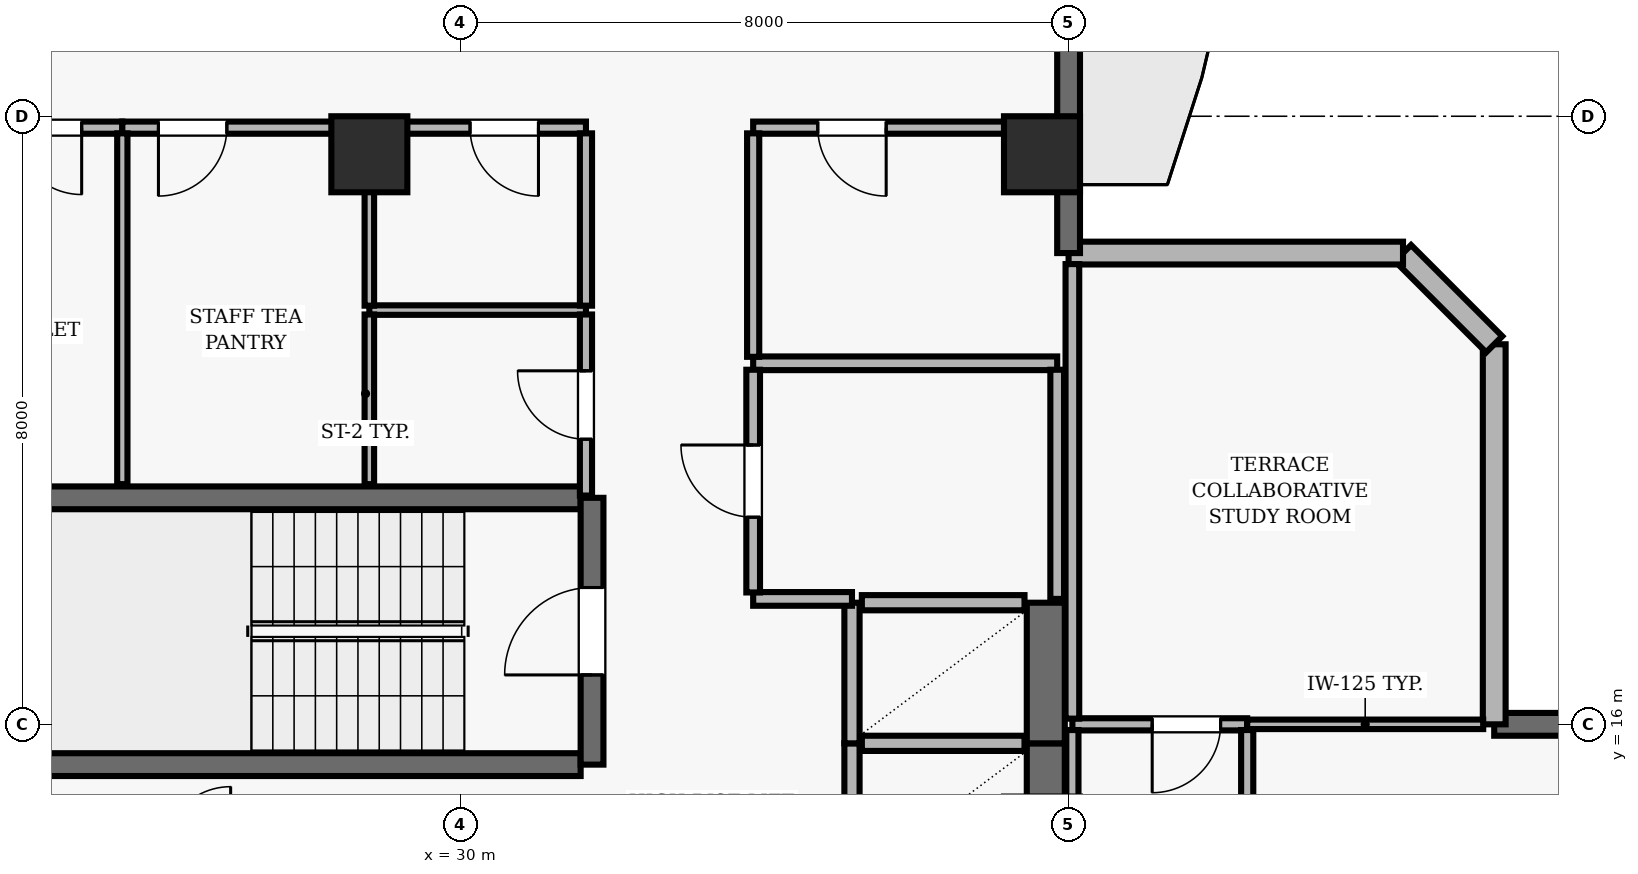
"""IFC4 building model, lengths in metres.
Left out: names, types, materials, properties, quantities, classifications, styles, units other than length and angle.
Written with IfcOpenShell. Run it as: python <this file> out.ifc"""

import sys

from ifc_helpers import new_model, si_unit, direction, frame, frame_2d, origin, origin_2d, place, context, subcontext, project, spatial, rectangle, extrude, element, fill, save


model = new_model("IFC4")
c1 = context("Model", 3, precision=1e-05, world=origin(), true_north=direction((0.0, 1.0)))
c2 = subcontext(c1, "Body", "Model", "MODEL_VIEW")
j1 = project(units=[si_unit("LENGTHUNIT", "METRE"), si_unit("PLANEANGLEUNIT", "RADIAN")], contexts=[c1])
p1 = place(None, origin())
s1 = spatial("IfcSite", under=j1, at=p1, CompositionType="ELEMENT")
p2 = place(p1, origin())
s2 = spatial("IfcBuilding", under=s1, at=p2, CompositionType="ELEMENT")
p3 = place(p2, frame((0.0, 0.0, 226.5)))
s3 = spatial("IfcBuildingStorey", under=s2, at=p3, CompositionType="ELEMENT", Elevation=226.5)
for number, where, z_axis, x_axis in (
    (1, (28.8, 23.5, 0.0), (0.0, 0.0, 1.0), (1.0, 0.0, 0.0)),
    (2, (37.65, 23.5, 0.0), (0.0, 0.0, 1.0), (1.0, 0.0, 0.0)),
):
    element("IfcColumn", number, at=place(p3, frame(where, z_axis=z_axis, x_axis=x_axis)), inside=s3, PredefinedType="COLUMN", context=c2, shape_type="SweptSolid", body=[
        extrude(rectangle(XDim=1.0, YDim=1.0, at=origin_2d()), origin(), (0.0, 0.0, 1.0), 3.9),
    ])
p4 = place(p3, frame((62.7, 16.0, 0.0), z_axis=(0.0, 0.0, 1.0), x_axis=(-1.0, 0.0, 0.0)))
e3 = element("IfcWall", 3, at=p4, inside=s3, PredefinedType="SOLIDWALL", context=c2, shape_type="SweptSolid", body=[
    extrude(rectangle(XDim=19.1, YDim=0.3, at=frame_2d((9.55, 0.0))), origin(), (0.0, 0.0, 1.0), 3.69),
])
p5 = place(p4, frame((7.85, 0.0, 0.0)))
e4 = element("IfcOpeningElement", 4, at=p5, cuts=e3, PredefinedType="OPENING", context=c2, shape_type="SweptSolid", body=[
    extrude(rectangle(XDim=1.0, YDim=2.2, at=frame_2d((0.5, 1.1))), frame((0.0, 0.16, 0.0), z_axis=(0.0, -1.0, 0.0), x_axis=(1.0, 0.0, 0.0)), (0.0, 0.0, 1.0), 0.32),
])
p6 = place(p4, frame((1.683, 0.0, 0.9)))
e5 = element("IfcOpeningElement", 5, at=p6, cuts=e3, PredefinedType="OPENING", context=c2, shape_type="SweptSolid", body=[
    extrude(rectangle(XDim=3.0, YDim=2.2, at=frame_2d((1.5, 1.1))), frame((0.0, 0.16, 0.0), z_axis=(0.0, -1.0, 0.0), x_axis=(1.0, 0.0, 0.0)), (0.0, 0.0, 1.0), 0.32),
])
p7 = place(p3, frame((43.6, 16.0, 0.0), z_axis=(0.0, 0.0, 1.0), x_axis=(0.0, 1.0, 0.0)))
e6 = element("IfcWall", 6, at=p7, inside=s3, PredefinedType="SOLIDWALL", context=c2, shape_type="SweptSolid", body=[
    extrude(rectangle(XDim=5.0, YDim=0.3, at=frame_2d((2.5, 0.0))), origin(), (0.0, 0.0, 1.0), 3.69),
])
p8 = place(p3, frame((43.6, 21.0, 0.0), z_axis=(0.0, 0.0, 1.0), x_axis=(-0.707178703759, 0.707034851297, 0.0)))
e7 = element("IfcWall", 7, at=p8, inside=s3, PredefinedType="SOLIDWALL", context=c2, shape_type="SweptSolid", body=[
    extrude(rectangle(XDim=1.697, YDim=0.3, at=frame_2d((0.849, 0.0))), origin(), (0.0, 0.0, 1.0), 3.69),
])
p9 = place(p3, frame((42.4, 22.2, 0.0), z_axis=(0.0, 0.0, 1.0), x_axis=(-1.0, 0.0, 0.0)))
e8 = element("IfcWall", 8, at=p9, inside=s3, PredefinedType="SOLIDWALL", context=c2, shape_type="SweptSolid", body=[
    extrude(rectangle(XDim=4.4, YDim=0.3, at=frame_2d((2.2, 0.0))), origin(), (0.0, 0.0, 1.0), 3.69),
])
p10 = place(p3, frame((38.0, 22.2, 0.0), z_axis=(0.0, 0.0, 1.0), x_axis=(0.0, 1.0, 0.0)))
e9 = element("IfcWall", 9, at=p10, inside=s3, PredefinedType="SOLIDWALL", context=c2, shape_type="SweptSolid", body=[
    extrude(rectangle(XDim=18.5, YDim=0.3, at=frame_2d((9.25, 0.0))), origin(), (0.0, 0.0, 1.0), 3.69),
])
p11 = place(p10, frame((9.95, 0.0, 0.0)))
e10 = element("IfcOpeningElement", 10, at=p11, cuts=e9, PredefinedType="OPENING", context=c2, shape_type="SweptSolid", body=[
    extrude(rectangle(XDim=1.0, YDim=2.2, at=frame_2d((0.5, 1.1))), frame((0.0, 0.16, 0.0), z_axis=(0.0, -1.0, 0.0), x_axis=(1.0, 0.0, 0.0)), (0.0, 0.0, 1.0), 0.32),
])
for number, where, z_axis, x_axis in (
    (11, (31.58, 18.98, 0.0), (0.0, 0.0, 1.0), (-1.0, 0.0, 0.0)),
    (12, (23.22, 15.47, 0.0), (0.0, 0.0, 1.0), (1.0, 0.0, 0.0)),
):
    element("IfcWall", number, at=place(p3, frame(where, z_axis=z_axis, x_axis=x_axis)), inside=s3, PredefinedType="SHEAR", context=c2, shape_type="SweptSolid", body=[
        extrude(rectangle(XDim=8.36, YDim=0.3, at=frame_2d((4.18, 0.0))), origin(), (0.0, 0.0, 1.0), 3.69),
    ])
p12 = place(p3, frame((31.73, 15.47, 0.0), z_axis=(0.0, 0.0, 1.0), x_axis=(0.0, 1.0, 0.0)))
e13 = element("IfcWall", 13, at=p12, inside=s3, PredefinedType="SHEAR", context=c2, shape_type="SweptSolid", body=[
    extrude(rectangle(XDim=3.51, YDim=0.3, at=frame_2d((1.755, 0.0))), origin(), (0.0, 0.0, 1.0), 3.69),
])
p13 = place(p12, frame((1.18, 0.0, 0.0)))
e14 = element("IfcOpeningElement", 14, at=p13, cuts=e13, PredefinedType="OPENING", context=c2, shape_type="SweptSolid", body=[
    extrude(rectangle(XDim=1.15, YDim=2.15, at=frame_2d((0.575, 1.075))), frame((0.0, 0.16, 0.0), z_axis=(0.0, -1.0, 0.0), x_axis=(1.0, 0.0, 0.0)), (0.0, 0.0, 1.0), 0.32),
])
p14 = place(p3, frame((35.15, 15.75, 0.0), z_axis=(0.0, 0.0, 1.0), x_axis=(0.0, -1.0, 0.0)))
e15 = element("IfcWall", 15, at=p14, inside=s3, PredefinedType="SOLIDWALL", context=c2, shape_type="SweptSolid", body=[
    extrude(rectangle(XDim=1.85, YDim=0.2, at=frame_2d((0.925, 0.0))), origin(), (0.0, 0.0, 1.0), 3.69),
])
p15 = place(p3, frame((37.7, 13.9, 0.0), z_axis=(0.0, 0.0, 1.0), x_axis=(0.0, 1.0, 0.0)))
e16 = element("IfcWall", 16, at=p15, inside=s3, PredefinedType="SHEAR", context=c2, shape_type="SweptSolid", body=[
    extrude(rectangle(XDim=1.85, YDim=0.5, at=frame_2d((0.925, 0.0))), origin(), (0.0, 0.0, 1.0), 3.69),
])
p16 = place(p3, frame((37.42, 15.75, 0.0), z_axis=(0.0, 0.0, 1.0), x_axis=(-1.0, 0.0, 0.0)))
e17 = element("IfcWall", 17, at=p16, inside=s3, PredefinedType="SOLIDWALL", context=c2, shape_type="SweptSolid", body=[
    extrude(rectangle(XDim=2.14, YDim=0.2, at=frame_2d((1.07, 0.0))), origin(), (0.0, 0.0, 1.0), 3.69),
])
p17 = place(p3, frame((35.15, 17.6, 0.0), z_axis=(0.0, 0.0, 1.0), x_axis=(0.0, -1.0, 0.0)))
e18 = element("IfcWall", 18, at=p17, inside=s3, PredefinedType="SOLIDWALL", context=c2, shape_type="SweptSolid", body=[
    extrude(rectangle(XDim=1.85, YDim=0.2, at=frame_2d((0.925, 0.0))), origin(), (0.0, 0.0, 1.0), 3.69),
])
p18 = place(p3, frame((37.7, 15.75, 0.0), z_axis=(0.0, 0.0, 1.0), x_axis=(0.0, 1.0, 0.0)))
e19 = element("IfcWall", 19, at=p18, inside=s3, PredefinedType="SHEAR", context=c2, shape_type="SweptSolid", body=[
    extrude(rectangle(XDim=1.85, YDim=0.5, at=frame_2d((0.925, 0.0))), origin(), (0.0, 0.0, 1.0), 3.69),
])
p19 = place(p3, frame((37.42, 17.6, 0.0), z_axis=(0.0, 0.0, 1.0), x_axis=(-1.0, 0.0, 0.0)))
e20 = element("IfcWall", 20, at=p19, inside=s3, PredefinedType="SOLIDWALL", context=c2, shape_type="SweptSolid", body=[
    extrude(rectangle(XDim=2.14, YDim=0.2, at=frame_2d((1.07, 0.0))), origin(), (0.0, 0.0, 1.0), 3.69),
])
p20 = place(p3, frame((25.55, 23.85, 0.0), z_axis=(0.0, 0.0, 1.0), x_axis=(-1.0, 0.0, 0.0)))
e21 = element("IfcWall", 21, at=p20, inside=s3, PredefinedType="PARTITIONING", context=c2, shape_type="SweptSolid", body=[
    extrude(rectangle(XDim=3.35, YDim=0.16, at=frame_2d((1.675, 0.0))), origin(), (0.0, 0.0, 1.0), 3.146),
])
p21 = place(p20, frame((0.535, 0.0, 0.0)))
e22 = element("IfcOpeningElement", 22, at=p21, cuts=e21, PredefinedType="OPENING", context=c2, shape_type="SweptSolid", body=[
    extrude(rectangle(XDim=0.88, YDim=2.1, at=frame_2d((0.44, 1.05))), frame((0.0, 0.09, 0.0), z_axis=(0.0, -1.0, 0.0), x_axis=(1.0, 0.0, 0.0)), (0.0, 0.0, 1.0), 0.18),
])
p22 = place(p3, frame((28.8, 23.85, 0.0), z_axis=(0.0, 0.0, 1.0), x_axis=(-1.0, 0.0, 0.0)))
e23 = element("IfcWall", 23, at=p22, inside=s3, PredefinedType="PARTITIONING", context=c2, shape_type="SweptSolid", body=[
    extrude(rectangle(XDim=3.25, YDim=0.16, at=frame_2d((1.625, 0.0))), origin(), (0.0, 0.0, 1.0), 3.146),
])
p23 = place(p22, frame((1.875, 0.0, 0.0)))
e24 = element("IfcOpeningElement", 24, at=p23, cuts=e23, PredefinedType="OPENING", context=c2, shape_type="SweptSolid", body=[
    extrude(rectangle(XDim=0.9, YDim=2.1, at=frame_2d((0.45, 1.05))), frame((0.0, 0.09, 0.0), z_axis=(0.0, -1.0, 0.0), x_axis=(1.0, 0.0, 0.0)), (0.0, 0.0, 1.0), 0.18),
])
p24 = place(p3, frame((31.65, 21.45, 0.0), z_axis=(0.0, 0.0, 1.0), x_axis=(-1.0, 0.0, 0.0)))
e25 = element("IfcWall", 25, at=p24, inside=s3, PredefinedType="PARTITIONING", context=c2, shape_type="SweptSolid", body=[
    extrude(rectangle(XDim=2.85, YDim=0.125, at=frame_2d((1.425, 0.0))), origin(), (0.0, 0.0, 1.0), 3.69),
])
p25 = place(p3, frame((31.65, 23.85, 0.0), z_axis=(0.0, 0.0, 1.0), x_axis=(-1.0, 0.0, 0.0)))
e26 = element("IfcWall", 26, at=p25, inside=s3, PredefinedType="PARTITIONING", context=c2, shape_type="SweptSolid", body=[
    extrude(rectangle(XDim=2.85, YDim=0.16, at=frame_2d((1.425, 0.0))), origin(), (0.0, 0.0, 1.0), 3.146),
])
p26 = place(p25, frame((0.625, 0.0, 0.0)))
e27 = element("IfcOpeningElement", 27, at=p26, cuts=e26, PredefinedType="OPENING", context=c2, shape_type="SweptSolid", body=[
    extrude(rectangle(XDim=0.9, YDim=2.1, at=frame_2d((0.45, 1.05))), frame((0.0, 0.09, 0.0), z_axis=(0.0, -1.0, 0.0), x_axis=(1.0, 0.0, 0.0)), (0.0, 0.0, 1.0), 0.18),
])
p27 = place(p3, frame((33.85, 17.65, 0.0), z_axis=(0.0, 0.0, 1.0), x_axis=(1.0, 0.0, 0.0)))
e28 = element("IfcWall", 28, at=p27, inside=s3, PredefinedType="PARTITIONING", context=c2, shape_type="SweptSolid", body=[
    extrude(rectangle(XDim=1.3, YDim=0.18, at=frame_2d((0.65, 0.0))), origin(), (0.0, 0.0, 1.0), 3.69),
])
p28 = place(p3, frame((37.85, 20.75, 0.0), z_axis=(0.0, 0.0, 1.0), x_axis=(-1.0, 0.0, 0.0)))
e29 = element("IfcWall", 29, at=p28, inside=s3, PredefinedType="PARTITIONING", context=c2, shape_type="SweptSolid", body=[
    extrude(rectangle(XDim=4.0, YDim=0.18, at=frame_2d((2.0, 0.0))), origin(), (0.0, 0.0, 1.0), 3.69),
])
p29 = place(p3, frame((37.85, 23.85, 0.0), z_axis=(0.0, 0.0, 1.0), x_axis=(-1.0, 0.0, 0.0)))
e30 = element("IfcWall", 30, at=p29, inside=s3, PredefinedType="PARTITIONING", context=c2, shape_type="SweptSolid", body=[
    extrude(rectangle(XDim=4.0, YDim=0.16, at=frame_2d((2.0, 0.0))), origin(), (0.0, 0.0, 1.0), 3.146),
])
p30 = place(p29, frame((2.25, 0.0, 0.0)))
e31 = element("IfcOpeningElement", 31, at=p30, cuts=e30, PredefinedType="OPENING", context=c2, shape_type="SweptSolid", body=[
    extrude(rectangle(XDim=0.9, YDim=2.1, at=frame_2d((0.45, 1.05))), frame((0.0, 0.09, 0.0), z_axis=(0.0, -1.0, 0.0), x_axis=(1.0, 0.0, 0.0)), (0.0, 0.0, 1.0), 0.18),
])
p31 = place(p3, frame((40.35, 16.0, 0.0), z_axis=(0.0, 0.0, 1.0), x_axis=(-1.0, 0.0, 0.0)))
e32 = element("IfcWall", 32, at=p31, inside=s3, PredefinedType="PARTITIONING", context=c2, shape_type="SweptSolid", body=[
    extrude(rectangle(XDim=2.3, YDim=0.16, at=frame_2d((1.15, 0.0))), origin(), (0.0, 0.0, 1.0), 3.39),
])
p32 = place(p31, frame((0.35, 0.0, 0.0)))
e33 = element("IfcOpeningElement", 33, at=p32, cuts=e32, PredefinedType="OPENING", context=c2, shape_type="SweptSolid", body=[
    extrude(rectangle(XDim=0.9, YDim=2.1, at=frame_2d((0.45, 1.05))), frame((0.0, 0.09, 0.0), z_axis=(0.0, -1.0, 0.0), x_axis=(1.0, 0.0, 0.0)), (0.0, 0.0, 1.0), 0.18),
])
p33 = place(p3, frame((40.35, 16.0, 0.0), z_axis=(0.0, 0.0, 1.0), x_axis=(1.0, 0.0, 0.0)))
e34 = element("IfcWall", 34, at=p33, inside=s3, PredefinedType="PARTITIONING", context=c2, shape_type="SweptSolid", body=[
    extrude(rectangle(XDim=3.105, YDim=0.125, at=frame_2d((1.552, 0.0))), origin(), (0.0, 0.0, 1.0), 3.39),
])
p34 = place(p3, frame((25.55, 19.16, 0.0), z_axis=(0.0, 0.0, 1.0), x_axis=(0.0, 1.0, 0.0)))
e35 = element("IfcWall", 35, at=p34, inside=s3, PredefinedType="PARTITIONING", context=c2, shape_type="SweptSolid", body=[
    extrude(rectangle(XDim=4.615, YDim=0.135, at=frame_2d((2.308, 0.0))), origin(), (0.0, 0.0, 1.0), 3.69),
])
p35 = place(p3, frame((28.8, 21.392, 0.0), z_axis=(0.0, 0.0, 1.0), x_axis=(0.0, -1.0, 0.0)))
e36 = element("IfcWall", 36, at=p35, inside=s3, PredefinedType="PARTITIONING", context=c2, shape_type="SweptSolid", body=[
    extrude(rectangle(XDim=2.232, YDim=0.125, at=frame_2d((1.116, 0.0))), origin(), (0.0, 0.0, 1.0), 3.69),
])
p36 = place(p3, frame((28.8, 23.775, 0.0), z_axis=(0.0, 0.0, 1.0), x_axis=(0.0, -1.0, 0.0)))
e37 = element("IfcWall", 37, at=p36, inside=s3, PredefinedType="PARTITIONING", context=c2, shape_type="SweptSolid", body=[
    extrude(rectangle(XDim=2.267, YDim=0.125, at=frame_2d((1.133, 0.0))), origin(), (0.0, 0.0, 1.0), 3.69),
])
p37 = place(p3, frame((31.65, 19.01, 0.0), z_axis=(0.0, 0.0, 1.0), x_axis=(0.0, 1.0, 0.0)))
e38 = element("IfcWall", 38, at=p37, inside=s3, PredefinedType="PARTITIONING", context=c2, shape_type="SweptSolid", body=[
    extrude(rectangle(XDim=2.382, YDim=0.16, at=frame_2d((1.191, 0.0))), origin(), (0.0, 0.0, 1.0), 3.69),
])
p38 = place(p37, frame((0.741, 0.0, 0.0)))
e39 = element("IfcOpeningElement", 39, at=p38, cuts=e38, PredefinedType="OPENING", context=c2, shape_type="SweptSolid", body=[
    extrude(rectangle(XDim=0.9, YDim=2.1, at=frame_2d((0.45, 1.05))), frame((0.0, 0.09, 0.0), z_axis=(0.0, -1.0, 0.0), x_axis=(1.0, 0.0, 0.0)), (0.0, 0.0, 1.0), 0.18),
])
p39 = place(p3, frame((31.65, 23.775, 0.0), z_axis=(0.0, 0.0, 1.0), x_axis=(0.0, -1.0, 0.0)))
e40 = element("IfcWall", 40, at=p39, inside=s3, PredefinedType="PARTITIONING", context=c2, shape_type="SweptSolid", body=[
    extrude(rectangle(XDim=2.267, YDim=0.16, at=frame_2d((1.133, 0.0))), origin(), (0.0, 0.0, 1.0), 3.69),
])
p40 = place(p3, frame((33.85, 17.735, 0.0), z_axis=(0.0, 0.0, 1.0), x_axis=(0.0, 1.0, 0.0)))
e41 = element("IfcWall", 41, at=p40, inside=s3, PredefinedType="PARTITIONING", context=c2, shape_type="SweptSolid", body=[
    extrude(rectangle(XDim=2.93, YDim=0.18, at=frame_2d((1.465, 0.0))), origin(), (0.0, 0.0, 1.0), 3.69),
])
p41 = place(p40, frame((0.99, 0.0, 0.0)))
e42 = element("IfcOpeningElement", 42, at=p41, cuts=e41, PredefinedType="OPENING", context=c2, shape_type="SweptSolid", body=[
    extrude(rectangle(XDim=0.95, YDim=2.1, at=frame_2d((0.475, 1.05))), frame((0.0, 0.1, 0.0), z_axis=(0.0, -1.0, 0.0), x_axis=(1.0, 0.0, 0.0)), (0.0, 0.0, 1.0), 0.2),
])
p42 = place(p3, frame((33.85, 20.835, 0.0), z_axis=(0.0, 0.0, 1.0), x_axis=(0.0, 1.0, 0.0)))
e43 = element("IfcWall", 43, at=p42, inside=s3, PredefinedType="PARTITIONING", context=c2, shape_type="SweptSolid", body=[
    extrude(rectangle(XDim=2.94, YDim=0.16, at=frame_2d((1.47, 0.0))), origin(), (0.0, 0.0, 1.0), 3.69),
])
p43 = place(p3, frame((37.85, 17.65, 0.0), z_axis=(0.0, 0.0, 1.0), x_axis=(0.0, 1.0, 0.0)))
e44 = element("IfcWall", 44, at=p43, inside=s3, PredefinedType="PARTITIONING", context=c2, shape_type="SweptSolid", body=[
    extrude(rectangle(XDim=3.015, YDim=0.18, at=frame_2d((1.508, 0.0))), origin(), (0.0, 0.0, 1.0), 3.146),
])
p44 = place(p3, frame((38.05, 15.925, 0.0), z_axis=(0.0, 0.0, 1.0), x_axis=(0.0, -1.0, 0.0)))
e45 = element("IfcWall", 45, at=p44, inside=s3, PredefinedType="PARTITIONING", context=c2, shape_type="SweptSolid", body=[
    extrude(rectangle(XDim=6.375, YDim=0.16, at=frame_2d((3.188, 0.0))), origin(), (0.0, 0.0, 1.0), 3.146),
])
p45 = place(p3, frame((38.05, 22.055, 0.0), z_axis=(0.0, 0.0, 1.0), x_axis=(0.0, -1.0, 0.0)))
e46 = element("IfcWall", 46, at=p45, inside=s3, PredefinedType="PARTITIONING", context=c2, shape_type="SweptSolid", body=[
    extrude(rectangle(XDim=5.98, YDim=0.18, at=frame_2d((2.99, 0.0))), origin(), (0.0, 0.0, 1.0), 3.146),
])
p46 = place(p3, frame((40.35, 7.625, 0.0), z_axis=(0.0, 0.0, 1.0), x_axis=(0.0, 1.0, 0.0)))
e47 = element("IfcWall", 47, at=p46, inside=s3, PredefinedType="PARTITIONING", context=c2, shape_type="SweptSolid", body=[
    extrude(rectangle(XDim=8.3, YDim=0.16, at=frame_2d((4.15, 0.0))), origin(), (0.0, 0.0, 1.0), 3.69),
])
p47 = place(p46, frame((3.7, 0.0, 0.0)))
e48 = element("IfcOpeningElement", 48, at=p47, cuts=e47, PredefinedType="OPENING", context=c2, shape_type="SweptSolid", body=[
    extrude(rectangle(XDim=0.9, YDim=2.1, at=frame_2d((0.45, 1.05))), frame((0.0, 0.09, 0.0), z_axis=(0.0, -1.0, 0.0), x_axis=(1.0, 0.0, 0.0)), (0.0, 0.0, 1.0), 0.18),
])
p48 = place(p13, origin())
e49 = element("IfcDoor", 49, at=p48, inside=s3, OperationType="SINGLE_SWING_LEFT", PredefinedType="DOOR", context=c2, shape_type="SweptSolid", body=[
    extrude(rectangle(XDim=1.15, YDim=2.15, at=frame_2d((0.575, 1.075))), frame((0.0, 0.025, 0.0), z_axis=(0.0, -1.0, 0.0), x_axis=(1.0, 0.0, 0.0)), (0.0, 0.0, 1.0), 0.05),
])
fill(e14, e49)
p49 = place(p41, origin())
e50 = element("IfcDoor", 50, at=p49, inside=s3, OperationType="SINGLE_SWING_RIGHT", PredefinedType="DOOR", context=c2, shape_type="SweptSolid", body=[
    extrude(rectangle(XDim=0.95, YDim=2.1, at=frame_2d((0.475, 1.05))), frame((0.0, 0.025, 0.0), z_axis=(0.0, -1.0, 0.0), x_axis=(1.0, 0.0, 0.0)), (0.0, 0.0, 1.0), 0.05),
])
fill(e42, e50)
p50 = place(p30, origin())
e51 = element("IfcDoor", 51, at=p50, inside=s3, OperationType="SINGLE_SWING_LEFT", PredefinedType="DOOR", context=c2, shape_type="SweptSolid", body=[
    extrude(rectangle(XDim=0.9, YDim=2.1, at=frame_2d((0.45, 1.05))), frame((0.0, 0.025, 0.0), z_axis=(0.0, -1.0, 0.0), x_axis=(1.0, 0.0, 0.0)), (0.0, 0.0, 1.0), 0.05),
])
fill(e31, e51)
p51 = place(p38, origin())
e52 = element("IfcDoor", 52, at=p51, inside=s3, OperationType="SINGLE_SWING_RIGHT", PredefinedType="DOOR", context=c2, shape_type="SweptSolid", body=[
    extrude(rectangle(XDim=0.9, YDim=2.1, at=frame_2d((0.45, 1.05))), frame((0.0, 0.025, 0.0), z_axis=(0.0, -1.0, 0.0), x_axis=(1.0, 0.0, 0.0)), (0.0, 0.0, 1.0), 0.05),
])
fill(e39, e52)
p52 = place(p26, origin())
e53 = element("IfcDoor", 53, at=p52, inside=s3, OperationType="SINGLE_SWING_LEFT", PredefinedType="DOOR", context=c2, shape_type="SweptSolid", body=[
    extrude(rectangle(XDim=0.9, YDim=2.1, at=frame_2d((0.45, 1.05))), frame((0.0, 0.025, 0.0), z_axis=(0.0, -1.0, 0.0), x_axis=(1.0, 0.0, 0.0)), (0.0, 0.0, 1.0), 0.05),
])
fill(e27, e53)
p53 = place(p21, origin())
e54 = element("IfcDoor", 54, at=p53, inside=s3, OperationType="SINGLE_SWING_LEFT", PredefinedType="DOOR", context=c2, shape_type="SweptSolid", body=[
    extrude(rectangle(XDim=0.88, YDim=2.1, at=frame_2d((0.44, 1.05))), frame((0.0, 0.025, 0.0), z_axis=(0.0, -1.0, 0.0), x_axis=(1.0, 0.0, 0.0)), (0.0, 0.0, 1.0), 0.05),
])
fill(e22, e54)
p54 = place(p23, origin())
e55 = element("IfcDoor", 55, at=p54, inside=s3, OperationType="SINGLE_SWING_RIGHT", PredefinedType="DOOR", context=c2, shape_type="SweptSolid", body=[
    extrude(rectangle(XDim=0.9, YDim=2.1, at=frame_2d((0.45, 1.05))), frame((0.0, 0.025, 0.0), z_axis=(0.0, -1.0, 0.0), x_axis=(1.0, 0.0, 0.0)), (0.0, 0.0, 1.0), 0.05),
])
fill(e24, e55)
p55 = place(p32, origin())
e56 = element("IfcDoor", 56, at=p55, inside=s3, OperationType="SINGLE_SWING_RIGHT", PredefinedType="DOOR", context=c2, shape_type="SweptSolid", body=[
    extrude(rectangle(XDim=0.9, YDim=2.1, at=frame_2d((0.45, 1.05))), frame((0.0, 0.025, 0.0), z_axis=(0.0, -1.0, 0.0), x_axis=(1.0, 0.0, 0.0)), (0.0, 0.0, 1.0), 0.05),
])
fill(e33, e56)
save(model, sys.argv[1])
